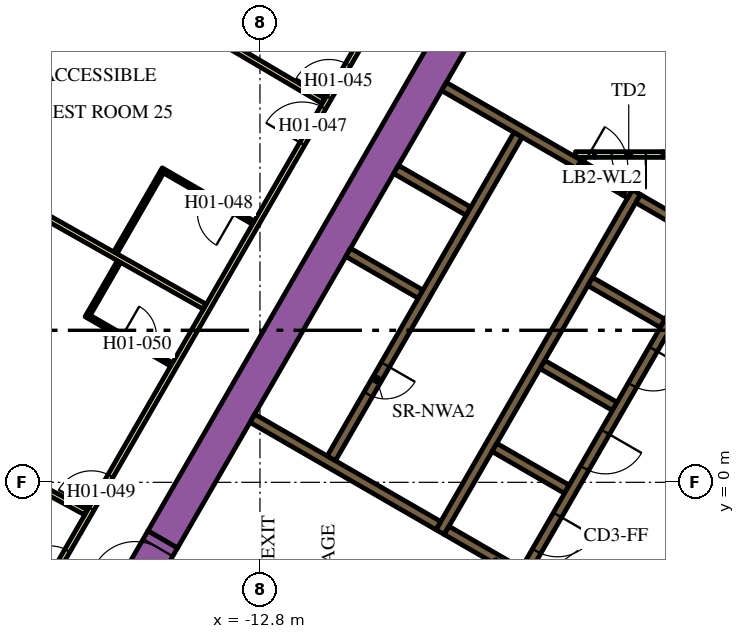
"""IFC4 building model, lengths in metres.
Left out: names, types, materials, properties, quantities, classifications, styles, units other than length and angle.
Written with IfcOpenShell. Run it as: python <this file> out.ifc"""

import sys

from ifc_helpers import new_model, si_unit, direction, frame, frame_2d, origin, place, context, subcontext, project, spatial, polyline, rectangle, outline, extrude, element, fill, save


model = new_model("IFC4")
c1 = context("Model", 3, precision=1e-05, world=origin(), true_north=direction((0.0, 1.0)))
c2 = subcontext(c1, "Body", "Model", "MODEL_VIEW")
j1 = project(units=[si_unit("LENGTHUNIT", "METRE"), si_unit("PLANEANGLEUNIT", "RADIAN")], contexts=[c1])
p1 = place(None, origin())
s1 = spatial("IfcSite", under=j1, at=p1, CompositionType="ELEMENT")
p2 = place(p1, origin())
s2 = spatial("IfcBuilding", under=s1, at=p2, CompositionType="ELEMENT")
p3 = place(p2, frame((0.0, 0.0, 31.5)))
s3 = spatial("IfcBuildingStorey", under=s2, at=p3, CompositionType="ELEMENT", Elevation=31.5)
p4 = place(p3, frame((-15.36, -1.503, 0.0), z_axis=(0.0, 0.0, 1.0), x_axis=(0.50000389221, 0.866023156604, 0.0)))
e1 = element("IfcWall", 1, at=p4, inside=s3, PredefinedType="SOLIDWALL", context=c2, shape_type="SweptSolid", body=[
    extrude(rectangle(XDim=21.0, YDim=0.9, at=frame_2d((10.5, 0.0))), origin(), (0.0, 0.0, 1.0), 3.9),
])
p5 = place(p3, frame((-8.06, -1.311, 0.0), z_axis=(0.0, 0.0, 1.0), x_axis=(0.50000273126, 0.866023826885, 0.0)))
e2 = element("IfcWall", 2, at=p5, inside=s3, PredefinedType="SOLIDWALL", context=c2, shape_type="SweptSolid", body=[
    extrude(rectangle(XDim=10.33, YDim=0.25, at=frame_2d((5.165, 0.0))), origin(), (0.0, 0.0, 1.0), 3.9),
])
p6 = place(p3, frame((-1.76, 6.836, 0.0), z_axis=(0.0, 0.0, 1.0), x_axis=(-0.865952863304, 0.500125622755, 0.0)))
e3 = element("IfcWall", 3, at=p6, inside=s3, PredefinedType="SOLIDWALL", context=c2, shape_type="SweptSolid", body=[
    extrude(rectangle(XDim=1.258, YDim=0.25, at=frame_2d((0.629, 0.0))), origin(), (0.0, 0.0, 1.0), 3.9),
])
for number, where, z_axis, x_axis in (
    (4, (-2.204, 4.182, 0.0), (0.0, 0.0, 1.0), (-0.866, 0.5, 0.0)),
    (5, (-5.369, 3.1, 0.0), (0.0, 0.0, 1.0), (0.866, -0.5, 0.0)),
    (6, (-4.724, -0.182, 0.0), (0.0, 0.0, 1.0), (-0.866, 0.5, 0.0)),
):
    element("IfcWall", number, at=place(p3, frame(where, z_axis=z_axis, x_axis=x_axis)), inside=s3, PredefinedType="SOLIDWALL", context=c2, shape_type="SweptSolid", body=[
        extrude(rectangle(XDim=2.2, YDim=0.25, at=frame_2d((1.1, 0.0))), origin(), (0.0, 0.0, 1.0), 3.9),
    ])
p7 = place(p3, origin())
e7 = element("IfcWall", 7, at=p7, inside=s3, PredefinedType="SOLIDWALL", context=c2, shape_type="SweptSolid", body=[
    extrude(outline(polyline([(-5.922, -2.257), (-5.922, -2.257), (-5.705, -2.382), (-5.83, -2.598), (-6.483, -2.221), (-6.591, -2.033), (-6.591, -2.033), (-6.7, -2.096), (-7.952, -1.373), (-7.827, -1.156), (-5.922, -2.257)])), origin(), (0.0, 0.0, 1.0), 3.9),
])
p8 = place(p3, frame((-8.106, -1.14, 0.0), z_axis=(0.0, 0.0, 1.0), x_axis=(-0.866000643155, 0.500042884217, 0.0)))
e8 = element("IfcWall", 8, at=p8, inside=s3, PredefinedType="SOLIDWALL", context=c2, shape_type="SweptSolid", body=[
    extrude(rectangle(XDim=5.65, YDim=0.25, at=frame_2d((2.825, 0.0))), origin(), (0.0, 0.0, 1.0), 3.9),
])
e9 = element("IfcWall", 9, at=p7, inside=s3, PredefinedType="SOLIDWALL", context=c2, shape_type="SweptSolid", body=[
    extrude(outline(polyline([(-3.128, 7.481), (-3.259, 7.557), (-3.134, 7.773), (-3.003, 7.698), (-3.128, 7.481)])), origin(), (0.0, 0.0, 1.0), 3.9),
])
for number, where, z_axis, x_axis in (
    (10, (-8.574, 4.95, 0.0), (0.0, 0.0, 1.0), (-0.866, 0.5, 0.0)),
    (11, (-7.314, 7.132, 0.0), (0.0, 0.0, 1.0), (-0.866, 0.5, 0.0)),
):
    element("IfcWall", number, at=place(p3, frame(where, z_axis=z_axis, x_axis=x_axis)), inside=s3, PredefinedType="SOLIDWALL", context=c2, shape_type="SweptSolid", body=[
        extrude(rectangle(XDim=2.2, YDim=0.25, at=frame_2d((1.1, 0.0))), origin(), (0.0, 0.0, 1.0), 3.9),
    ])
p9 = place(p3, frame((-7.959, 10.415, 0.0), z_axis=(0.0, 0.0, 1.0), x_axis=(0.866020958405, -0.500007699544, 0.0)))
e12 = element("IfcWall", 12, at=p9, inside=s3, PredefinedType="SOLIDWALL", context=c2, shape_type="SweptSolid", body=[
    extrude(rectangle(XDim=4.1, YDim=0.25, at=frame_2d((2.05, 0.0))), origin(), (0.0, 0.0, 1.0), 3.9),
])
p10 = place(p3, frame((-3.997, 8.625, 0.0), z_axis=(0.0, 0.0, 1.0), x_axis=(-1.0, 0.0, 0.0)))
e13 = element("IfcWall", 13, at=p10, inside=s3, PredefinedType="PARTITIONING", context=c2, shape_type="SweptSolid", body=[
    extrude(rectangle(XDim=0.502, YDim=0.15, at=frame_2d((0.251, 0.0))), origin(), (0.0, 0.0, 1.0), 2.75),
])
p11 = place(p3, frame((-2.196, 8.625, 0.0), z_axis=(0.0, 0.0, 1.0), x_axis=(1.0, 0.0, 0.0)))
e14 = element("IfcWall", 14, at=p11, inside=s3, PredefinedType="PARTITIONING", context=c2, shape_type="SweptSolid", body=[
    extrude(rectangle(XDim=1.146, YDim=0.15, at=frame_2d((0.573, 0.0))), origin(), (0.0, 0.0, 1.0), 2.75),
])
e15 = element("IfcWall", 15, at=p7, inside=s3, PredefinedType="PARTITIONING", context=c2, shape_type="SweptSolid", body=[
    extrude(outline(polyline([(-0.59, -0.872), (-0.265, -1.059), (-1.822, -3.756), (-2.147, -3.568), (-0.59, -0.872)])), origin(), (0.0, 0.0, 1.0), 2.75),
])
p12 = place(p3, frame((-6.008, 9.144, 0.0), z_axis=(0.0, 0.0, 1.0), x_axis=(-0.500006956611, -0.866021387346, 0.0)))
e16 = element("IfcWall", 16, at=p12, inside=s3, PredefinedType="SOLIDWALL", context=c2, shape_type="SweptSolid", body=[
    extrude(rectangle(XDim=9.83, YDim=0.25, at=frame_2d((4.915, 0.0))), origin(), (0.0, 0.0, 1.0), 3.9),
])
p13 = place(p12, frame((6.985, 0.0, 0.0)))
e17 = element("IfcOpeningElement", 17, at=p13, cuts=e16, PredefinedType="OPENING", context=c2, shape_type="SweptSolid", body=[
    extrude(rectangle(XDim=0.9, YDim=2.1, at=frame_2d((0.45, 1.05))), frame((0.0, 0.135, 0.0), z_axis=(0.0, -1.0, 0.0), x_axis=(1.0, 0.0, 0.0)), (0.0, 0.0, 1.0), 0.27),
])
p14 = place(p3, frame((-0.898, 6.194, 0.0), z_axis=(0.0, 0.0, 1.0), x_axis=(-0.499996202215, -0.866027596426, 0.0)))
e18 = element("IfcWall", 18, at=p14, inside=s3, PredefinedType="SOLIDWALL", context=c2, shape_type="SweptSolid", body=[
    extrude(rectangle(XDim=9.83, YDim=0.25, at=frame_2d((4.915, 0.0))), origin(), (0.0, 0.0, 1.0), 3.9),
])
p15 = place(p14, frame((0.585, 0.0, 0.0)))
e19 = element("IfcOpeningElement", 19, at=p15, cuts=e18, PredefinedType="OPENING", context=c2, shape_type="SweptSolid", body=[
    extrude(rectangle(XDim=1.1, YDim=2.1, at=frame_2d((0.55, 1.05))), frame((0.0, 0.135, 0.0), z_axis=(0.0, -1.0, 0.0), x_axis=(1.0, 0.0, 0.0)), (0.0, 0.0, 1.0), 0.27),
])
p16 = place(p14, frame((3.105, 0.0, 0.0)))
e20 = element("IfcOpeningElement", 20, at=p16, cuts=e18, PredefinedType="OPENING", context=c2, shape_type="SweptSolid", body=[
    extrude(rectangle(XDim=1.1, YDim=2.1, at=frame_2d((0.55, 1.05))), frame((0.0, 0.135, 0.0), z_axis=(0.0, -1.0, 0.0), x_axis=(1.0, 0.0, 0.0)), (0.0, 0.0, 1.0), 0.27),
])
p17 = place(p14, frame((5.625, 0.0, 0.0)))
e21 = element("IfcOpeningElement", 21, at=p17, cuts=e18, PredefinedType="OPENING", context=c2, shape_type="SweptSolid", body=[
    extrude(rectangle(XDim=1.1, YDim=2.1, at=frame_2d((0.55, 1.05))), frame((0.0, 0.135, 0.0), z_axis=(0.0, -1.0, 0.0), x_axis=(1.0, 0.0, 0.0)), (0.0, 0.0, 1.0), 0.27),
])
p18 = place(p14, frame((8.145, 0.0, 0.0)))
e22 = element("IfcOpeningElement", 22, at=p18, cuts=e18, PredefinedType="OPENING", context=c2, shape_type="SweptSolid", body=[
    extrude(rectangle(XDim=1.1, YDim=2.1, at=frame_2d((0.55, 1.05))), frame((0.0, 0.135, 0.0), z_axis=(0.0, -1.0, 0.0), x_axis=(1.0, 0.0, 0.0)), (0.0, 0.0, 1.0), 0.27),
])
p19 = place(p3, frame((-2.196, 8.625, 0.0), z_axis=(0.0, 0.0, 1.0), x_axis=(-1.0, 0.0, 0.0)))
e23 = element("IfcWall", 23, at=p19, inside=s3, PredefinedType="PARTITIONING", context=c2, shape_type="SweptSolid", body=[
    extrude(rectangle(XDim=1.8, YDim=0.15, at=frame_2d((0.9, 0.0))), origin(), (0.0, 0.0, 1.0), 2.75),
])
p20 = place(p19, frame((0.45, 0.0, 0.0)))
e24 = element("IfcOpeningElement", 24, at=p20, cuts=e23, PredefinedType="OPENING", context=c2, shape_type="SweptSolid", body=[
    extrude(rectangle(XDim=0.9, YDim=2.1, at=frame_2d((0.45, 1.05))), frame((0.0, 0.085, 0.0), z_axis=(0.0, -1.0, 0.0), x_axis=(1.0, 0.0, 0.0)), (0.0, 0.0, 1.0), 0.17),
])
p21 = place(p3, frame((-4.409, 8.365, 0.0), z_axis=(0.0, 0.0, 1.0), x_axis=(0.866034573852, -0.49998411664, 0.0)))
e25 = element("IfcWall", 25, at=p21, inside=s3, PredefinedType="SOLIDWALL", context=c2, shape_type="SweptSolid", body=[
    extrude(rectangle(XDim=1.4, YDim=0.25, at=frame_2d((0.7, 0.0))), origin(), (0.0, 0.0, 1.0), 3.9),
])
p22 = place(p21, frame((0.1, 0.0, 0.0)))
e26 = element("IfcOpeningElement", 26, at=p22, cuts=e25, PredefinedType="OPENING", context=c2, shape_type="SweptSolid", body=[
    extrude(rectangle(XDim=1.2, YDim=2.1, at=frame_2d((0.6, 1.05))), frame((0.0, 0.135, 0.0), z_axis=(0.0, -1.0, 0.0), x_axis=(1.0, 0.0, 0.0)), (0.0, 0.0, 1.0), 0.27),
])
p23 = place(p3, frame((-16.209, -2.976, 0.0), z_axis=(0.0, 0.0, 1.0), x_axis=(0.499954529098, 0.86605165483, 0.0)))
e27 = element("IfcWall", 27, at=p23, inside=s3, PredefinedType="SOLIDWALL", context=c2, shape_type="SweptSolid", body=[
    extrude(rectangle(XDim=1.7, YDim=0.9, at=frame_2d((0.85, 0.0))), origin(), (0.0, 0.0, 1.0), 3.9),
])
p24 = place(p23, frame((0.25, 0.0, 0.0)))
e28 = element("IfcOpeningElement", 28, at=p24, cuts=e27, PredefinedType="OPENING", context=c2, shape_type="SweptSolid", body=[
    extrude(rectangle(XDim=1.2, YDim=2.1, at=frame_2d((0.6, 1.05))), frame((0.0, 0.46, 0.0), z_axis=(0.0, -1.0, 0.0), x_axis=(1.0, 0.0, 0.0)), (0.0, 0.0, 1.0), 0.92),
])
p25 = place(p3, frame((-19.081, -3.9, 0.0), z_axis=(0.0, 0.0, 1.0), x_axis=(0.499998313975, 0.866026377209, 0.0)))
e29 = element("IfcWall", 29, at=p25, inside=s3, PredefinedType="PARTITIONING", context=c2, shape_type="SweptSolid", body=[
    extrude(rectangle(XDim=25.766, YDim=0.15, at=frame_2d((12.883, 0.0))), origin(), (0.0, 0.0, 1.0), 2.75),
])
p26 = place(p25, frame((24.586, 0.0, 0.0)))
e30 = element("IfcOpeningElement", 30, at=p26, cuts=e29, PredefinedType="OPENING", context=c2, shape_type="SweptSolid", body=[
    extrude(rectangle(XDim=1.0, YDim=2.1, at=frame_2d((0.5, 1.05))), frame((0.0, 0.085, 0.0), z_axis=(0.0, -1.0, 0.0), x_axis=(1.0, 0.0, 0.0)), (0.0, 0.0, 1.0), 0.17),
])
p27 = place(p25, frame((16.196, 0.0, 0.0)))
e31 = element("IfcOpeningElement", 31, at=p27, cuts=e29, PredefinedType="OPENING", context=c2, shape_type="SweptSolid", body=[
    extrude(rectangle(XDim=1.0, YDim=2.1, at=frame_2d((0.5, 1.05))), frame((0.0, 0.085, 0.0), z_axis=(0.0, -1.0, 0.0), x_axis=(1.0, 0.0, 0.0)), (0.0, 0.0, 1.0), 0.17),
])
p28 = place(p25, frame((14.789, 0.0, 0.0)))
e32 = element("IfcOpeningElement", 32, at=p28, cuts=e29, PredefinedType="OPENING", context=c2, shape_type="SweptSolid", body=[
    extrude(rectangle(XDim=1.1, YDim=2.1, at=frame_2d((0.55, 1.05))), frame((0.0, 0.085, 0.0), z_axis=(0.0, -1.0, 0.0), x_axis=(1.0, 0.0, 0.0)), (0.0, 0.0, 1.0), 0.17),
])
p29 = place(p25, frame((3.698, 0.0, 0.0)))
e33 = element("IfcOpeningElement", 33, at=p29, cuts=e29, PredefinedType="OPENING", context=c2, shape_type="SweptSolid", body=[
    extrude(rectangle(XDim=1.0, YDim=2.1, at=frame_2d((0.5, 1.05))), frame((0.0, 0.085, 0.0), z_axis=(0.0, -1.0, 0.0), x_axis=(1.0, 0.0, 0.0)), (0.0, 0.0, 1.0), 0.17),
])
p30 = place(p25, frame((1.531, 0.0, 0.0)))
e34 = element("IfcOpeningElement", 34, at=p30, cuts=e29, PredefinedType="OPENING", context=c2, shape_type="SweptSolid", body=[
    extrude(rectangle(XDim=0.9, YDim=2.1, at=frame_2d((0.45, 1.05))), frame((0.0, 0.085, 0.0), z_axis=(0.0, -1.0, 0.0), x_axis=(1.0, 0.0, 0.0)), (0.0, 0.0, 1.0), 0.17),
])
p31 = place(p3, frame((-24.145, 2.871, 0.0), z_axis=(0.0, 0.0, 1.0), x_axis=(0.879551725039, -0.475803281809, 0.0)))
e35 = element("IfcWall", 35, at=p31, inside=s3, PredefinedType="PARTITIONING", context=c2, shape_type="SweptSolid", body=[
    extrude(rectangle(XDim=7.688, YDim=0.15, at=frame_2d((3.844, 0.0))), origin(), (0.0, 0.0, 1.0), 2.75),
])
p32 = place(p3, frame((-21.052, 8.464, 0.0), z_axis=(0.0, 0.0, 1.0), x_axis=(0.87059371954, -0.492002617368, 0.0)))
e36 = element("IfcWall", 36, at=p32, inside=s3, PredefinedType="PARTITIONING", context=c2, shape_type="SweptSolid", body=[
    extrude(rectangle(XDim=7.803, YDim=0.15, at=frame_2d((3.902, 0.0))), origin(), (0.0, 0.0, 1.0), 2.75),
])
p33 = place(p3, frame((-17.856, 13.999, 0.0), z_axis=(0.0, 0.0, 1.0), x_axis=(0.861371519381, -0.507975497047, 0.0)))
e37 = element("IfcWall", 37, at=p33, inside=s3, PredefinedType="PARTITIONING", context=c2, shape_type="SweptSolid", body=[
    extrude(rectangle(XDim=7.804, YDim=0.15, at=frame_2d((3.902, 0.0))), origin(), (0.0, 0.0, 1.0), 2.75),
])
p34 = place(p3, frame((-12.972, 6.831, 0.0), z_axis=(0.0, 0.0, 1.0), x_axis=(-0.866018616679, 0.500011755427, 0.0)))
e38 = element("IfcWall", 38, at=p34, inside=s3, PredefinedType="PARTITIONING", context=c2, shape_type="SweptSolid", body=[
    extrude(rectangle(XDim=2.8, YDim=0.1, at=frame_2d((1.4, 0.0))), origin(), (0.0, 0.0, 1.0), 2.75),
])
p35 = place(p34, frame((0.55, 0.0, 0.0)))
e39 = element("IfcOpeningElement", 39, at=p35, cuts=e38, PredefinedType="OPENING", context=c2, shape_type="SweptSolid", body=[
    extrude(rectangle(XDim=1.0, YDim=2.1, at=frame_2d((0.5, 1.05))), frame((0.0, 0.06, 0.0), z_axis=(0.0, -1.0, 0.0), x_axis=(1.0, 0.0, 0.0)), (0.0, 0.0, 1.0), 0.12),
])
p36 = place(p3, frame((-15.379, 8.163, 0.0), z_axis=(0.0, 0.0, 1.0), x_axis=(-0.499987006516, -0.866032905446, 0.0)))
e40 = element("IfcWall", 40, at=p36, inside=s3, PredefinedType="PARTITIONING", context=c2, shape_type="SweptSolid", body=[
    extrude(rectangle(XDim=2.45, YDim=0.1, at=frame_2d((1.225, 0.0))), origin(), (0.0, 0.0, 1.0), 2.75),
])
p37 = place(p3, frame((-17.378, 4.401, 0.0), z_axis=(0.0, 0.0, 1.0), x_axis=(0.865997922154, -0.500047596559, 0.0)))
e41 = element("IfcWall", 41, at=p37, inside=s3, PredefinedType="PARTITIONING", context=c2, shape_type="SweptSolid", body=[
    extrude(rectangle(XDim=2.6, YDim=0.1, at=frame_2d((1.3, 0.0))), origin(), (0.0, 0.0, 1.0), 2.75),
])
p38 = place(p37, frame((1.1, 0.0, 0.0)))
e42 = element("IfcOpeningElement", 42, at=p38, cuts=e41, PredefinedType="OPENING", context=c2, shape_type="SweptSolid", body=[
    extrude(rectangle(XDim=0.9, YDim=2.1, at=frame_2d((0.45, 1.05))), frame((0.0, 0.06, 0.0), z_axis=(0.0, -1.0, 0.0), x_axis=(1.0, 0.0, 0.0)), (0.0, 0.0, 1.0), 0.12),
])
p39 = place(p3, frame((-17.309, 4.419, 0.0), z_axis=(0.0, 0.0, 1.0), x_axis=(0.499880961361, 0.866094119867, 0.0)))
e43 = element("IfcWall", 43, at=p39, inside=s3, PredefinedType="PARTITIONING", context=c2, shape_type="SweptSolid", body=[
    extrude(rectangle(XDim=1.6, YDim=0.1, at=frame_2d((0.8, 0.0))), origin(), (0.0, 0.0, 1.0), 2.75),
])
p40 = place(p13, origin())
e44 = element("IfcDoor", 44, at=p40, inside=s3, OperationType="SINGLE_SWING_LEFT", PredefinedType="DOOR", context=c2, shape_type="SweptSolid", body=[
    extrude(rectangle(XDim=0.9, YDim=2.1, at=frame_2d((0.45, 1.05))), frame((0.0, 0.025, 0.0), z_axis=(0.0, -1.0, 0.0), x_axis=(1.0, 0.0, 0.0)), (0.0, 0.0, 1.0), 0.05),
])
fill(e17, e44)
p41 = place(p16, origin())
e45 = element("IfcDoor", 45, at=p41, inside=s3, OperationType="DOUBLE_DOOR_SLIDING", PredefinedType="DOOR", context=c2, shape_type="SweptSolid", body=[
    extrude(rectangle(XDim=1.1, YDim=2.1, at=frame_2d((0.55, 1.05))), frame((0.0, 0.025, 0.0), z_axis=(0.0, -1.0, 0.0), x_axis=(1.0, 0.0, 0.0)), (0.0, 0.0, 1.0), 0.05),
])
fill(e20, e45)
p42 = place(p17, origin())
e46 = element("IfcDoor", 46, at=p42, inside=s3, OperationType="DOUBLE_DOOR_SLIDING", PredefinedType="DOOR", context=c2, shape_type="SweptSolid", body=[
    extrude(rectangle(XDim=1.1, YDim=2.1, at=frame_2d((0.55, 1.05))), frame((0.0, 0.025, 0.0), z_axis=(0.0, -1.0, 0.0), x_axis=(1.0, 0.0, 0.0)), (0.0, 0.0, 1.0), 0.05),
])
fill(e21, e46)
p43 = place(p18, origin())
e47 = element("IfcDoor", 47, at=p43, inside=s3, OperationType="DOUBLE_DOOR_SLIDING", PredefinedType="DOOR", context=c2, shape_type="SweptSolid", body=[
    extrude(rectangle(XDim=1.1, YDim=2.1, at=frame_2d((0.55, 1.05))), frame((0.0, 0.025, 0.0), z_axis=(0.0, -1.0, 0.0), x_axis=(1.0, 0.0, 0.0)), (0.0, 0.0, 1.0), 0.05),
])
fill(e22, e47)
p44 = place(p20, origin())
e48 = element("IfcDoor", 48, at=p44, inside=s3, OperationType="SINGLE_SWING_LEFT", PredefinedType="DOOR", context=c2, shape_type="SweptSolid", body=[
    extrude(rectangle(XDim=0.9, YDim=2.1, at=frame_2d((0.45, 1.05))), frame((0.0, 0.025, 0.0), z_axis=(0.0, -1.0, 0.0), x_axis=(1.0, 0.0, 0.0)), (0.0, 0.0, 1.0), 0.05),
])
fill(e24, e48)
p45 = place(p22, origin())
e49 = element("IfcDoor", 49, at=p45, inside=s3, OperationType="SINGLE_SWING_LEFT", PredefinedType="DOOR", context=c2, shape_type="SweptSolid", body=[
    extrude(rectangle(XDim=1.2, YDim=2.1, at=frame_2d((0.6, 1.05))), frame((0.0, 0.025, 0.0), z_axis=(0.0, -1.0, 0.0), x_axis=(1.0, 0.0, 0.0)), (0.0, 0.0, 1.0), 0.05),
])
fill(e26, e49)
p46 = place(p24, origin())
e50 = element("IfcDoor", 50, at=p46, inside=s3, OperationType="SINGLE_SWING_LEFT", PredefinedType="DOOR", context=c2, shape_type="SweptSolid", body=[
    extrude(rectangle(XDim=1.2, YDim=2.1, at=frame_2d((0.6, 1.05))), frame((0.0, 0.025, 0.0), z_axis=(0.0, -1.0, 0.0), x_axis=(1.0, 0.0, 0.0)), (0.0, 0.0, 1.0), 0.05),
])
fill(e28, e50)
p47 = place(p27, origin())
e51 = element("IfcDoor", 51, at=p47, inside=s3, OperationType="SINGLE_SWING_LEFT", PredefinedType="DOOR", context=c2, shape_type="SweptSolid", body=[
    extrude(rectangle(XDim=1.0, YDim=2.1, at=frame_2d((0.5, 1.05))), frame((0.0, 0.025, 0.0), z_axis=(0.0, -1.0, 0.0), x_axis=(1.0, 0.0, 0.0)), (0.0, 0.0, 1.0), 0.05),
])
fill(e31, e51)
p48 = place(p28, origin())
e52 = element("IfcDoor", 52, at=p48, inside=s3, OperationType="SINGLE_SWING_RIGHT", PredefinedType="DOOR", context=c2, shape_type="SweptSolid", body=[
    extrude(rectangle(XDim=1.1, YDim=2.1, at=frame_2d((0.55, 1.05))), frame((0.0, 0.025, 0.0), z_axis=(0.0, -1.0, 0.0), x_axis=(1.0, 0.0, 0.0)), (0.0, 0.0, 1.0), 0.05),
])
fill(e32, e52)
p49 = place(p35, origin())
e53 = element("IfcDoor", 53, at=p49, inside=s3, OperationType="SINGLE_SWING_LEFT", PredefinedType="DOOR", context=c2, shape_type="SweptSolid", body=[
    extrude(rectangle(XDim=1.0, YDim=2.1, at=frame_2d((0.5, 1.05))), frame((0.0, 0.025, 0.0), z_axis=(0.0, -1.0, 0.0), x_axis=(1.0, 0.0, 0.0)), (0.0, 0.0, 1.0), 0.05),
])
fill(e39, e53)
p50 = place(p29, origin())
e54 = element("IfcDoor", 54, at=p50, inside=s3, OperationType="SINGLE_SWING_LEFT", PredefinedType="DOOR", context=c2, shape_type="SweptSolid", body=[
    extrude(rectangle(XDim=1.0, YDim=2.1, at=frame_2d((0.5, 1.05))), frame((0.0, 0.025, 0.0), z_axis=(0.0, -1.0, 0.0), x_axis=(1.0, 0.0, 0.0)), (0.0, 0.0, 1.0), 0.05),
])
fill(e33, e54)
p51 = place(p38, origin())
e55 = element("IfcDoor", 55, at=p51, inside=s3, OperationType="SINGLE_SWING_LEFT", PredefinedType="DOOR", context=c2, shape_type="SweptSolid", body=[
    extrude(rectangle(XDim=0.9, YDim=2.1, at=frame_2d((0.45, 1.05))), frame((0.0, 0.025, 0.0), z_axis=(0.0, -1.0, 0.0), x_axis=(1.0, 0.0, 0.0)), (0.0, 0.0, 1.0), 0.05),
])
fill(e42, e55)
p52 = place(p30, origin())
e56 = element("IfcDoor", 56, at=p52, inside=s3, OperationType="SINGLE_SWING_LEFT", PredefinedType="DOOR", context=c2, shape_type="SweptSolid", body=[
    extrude(rectangle(XDim=0.9, YDim=2.1, at=frame_2d((0.45, 1.05))), frame((0.0, 0.025, 0.0), z_axis=(0.0, -1.0, 0.0), x_axis=(1.0, 0.0, 0.0)), (0.0, 0.0, 1.0), 0.05),
])
fill(e34, e56)
save(model, sys.argv[1])
